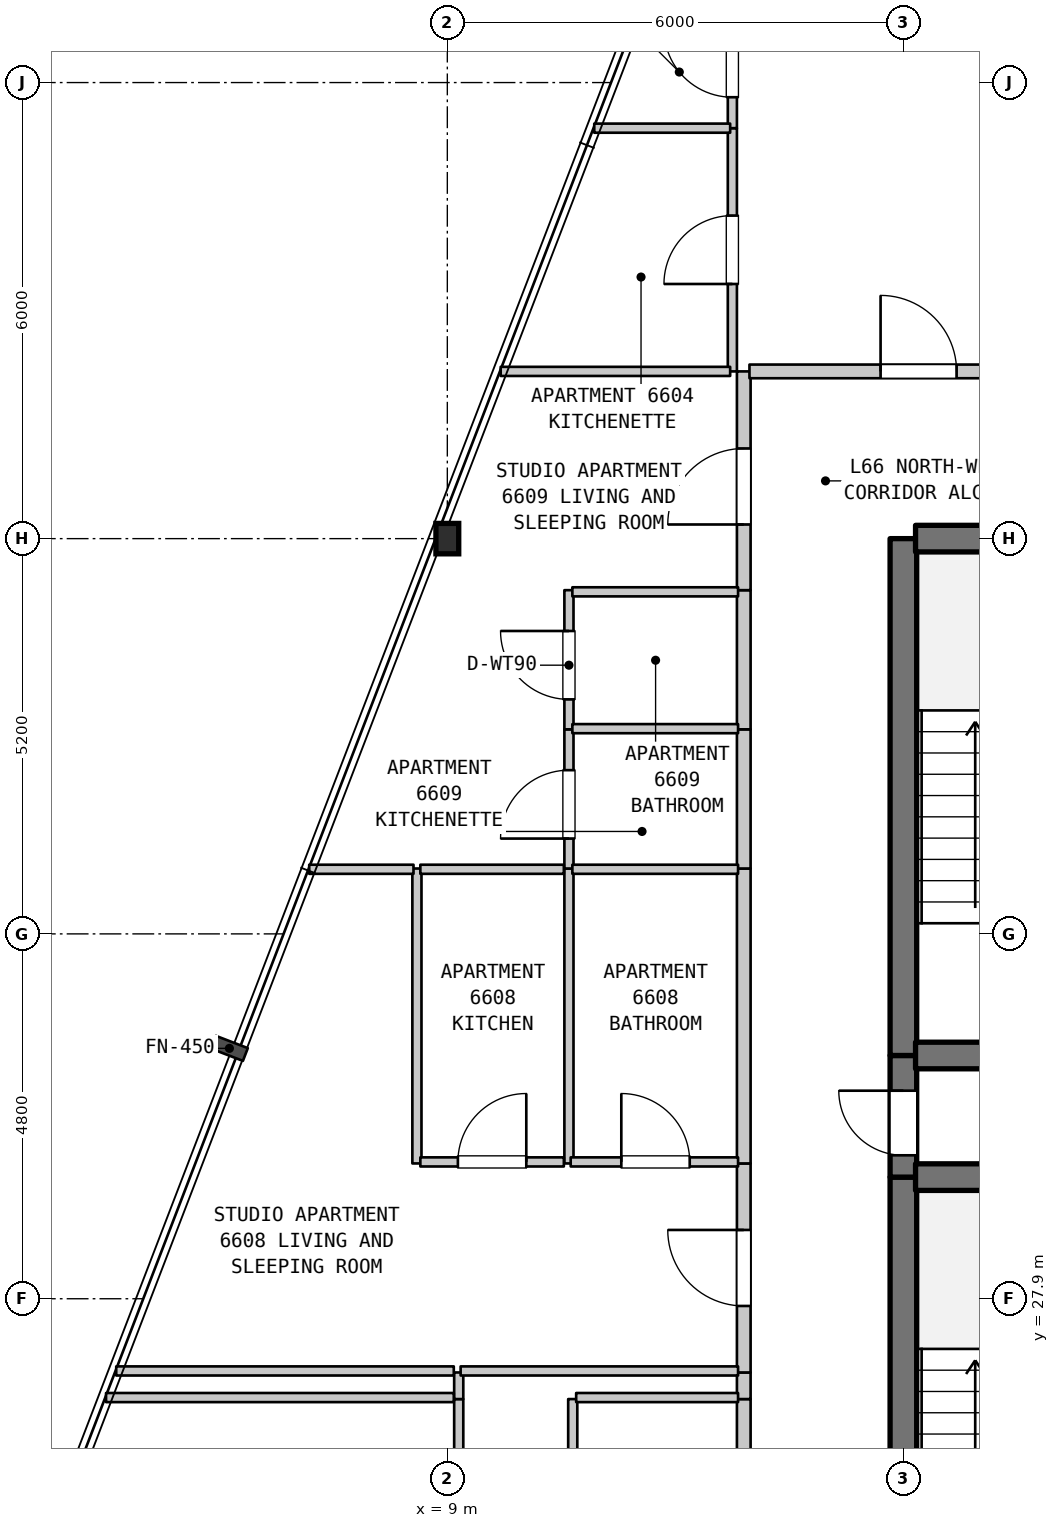
"""IFC4 building model, lengths in metres.
Left out: names, types, materials, properties, quantities, classifications, styles, units other than length and angle.
Written with IfcOpenShell. Run it as: python <this file> out.ifc"""

import sys

from ifc_helpers import new_model, si_unit, direction, frame, frame_2d, origin, origin_2d, place, context, subcontext, project, spatial, rectangle, i_section, extrude, element, fill, save


model = new_model("IFC4")
c1 = context("Model", 3, precision=1e-05, world=origin(), true_north=direction((0.0, 1.0)))
c2 = subcontext(c1, "Body", "Model", "MODEL_VIEW")
j1 = project(units=[si_unit("LENGTHUNIT", "METRE"), si_unit("PLANEANGLEUNIT", "RADIAN")], contexts=[c1])
p1 = place(None, origin())
s1 = spatial("IfcSite", under=j1, at=p1, CompositionType="ELEMENT")
p2 = place(p1, origin())
s2 = spatial("IfcBuilding", under=s1, at=p2, CompositionType="ELEMENT")
p3 = place(p2, frame((0.0, 0.0, 265.8)))
s3 = spatial("IfcBuildingStorey", under=s2, at=p3, CompositionType="ELEMENT", Elevation=265.8)
p4 = place(p3, frame((9.0, 37.9, 0.0), z_axis=(0.0, 0.0, 1.0), x_axis=(1.0, 0.0, 0.0)))
e1 = element("IfcColumn", 1, at=p4, inside=s3, PredefinedType="COLUMN", context=c2, shape_type="SweptSolid", body=[
    extrude(i_section(OverallWidth=0.3, OverallDepth=0.4, WebThickness=0.013, FlangeThickness=0.024, FilletRadius=0.027, at=origin_2d()), origin(), (0.0, 0.0, 1.0), 3.7),
])
p5 = place(p3, frame((8.6, 29.68, 0.0), z_axis=(0.0, 0.0, 1.0), x_axis=(0.0, 1.0, 0.0)))
e2 = element("IfcWall", 2, at=p5, inside=s3, PredefinedType="PARTITIONING", context=c2, shape_type="SweptSolid", body=[
    extrude(rectangle(XDim=3.88, YDim=0.12, at=frame_2d((1.94, 0.0))), origin(), (0.0, 0.0, 1.0), 3.39),
])
p6 = place(p3, frame((9.15, 20.5, 0.0), z_axis=(0.0, 0.0, 1.0), x_axis=(0.0, 1.0, 0.0)))
e3 = element("IfcWall", 3, at=p6, inside=s3, PredefinedType="PARTITIONING", context=c2, shape_type="SweptSolid", body=[
    extrude(rectangle(XDim=6.08, YDim=0.12, at=frame_2d((3.04, 0.0))), origin(), (0.0, 0.0, 1.0), 2.79),
])
p7 = place(p6, frame((1.173, 0.0, 0.0)))
e4 = element("IfcOpeningElement", 4, at=p7, cuts=e3, PredefinedType="OPENING", context=c2, shape_type="SweptSolid", body=[
    extrude(rectangle(XDim=0.9, YDim=2.15, at=frame_2d((0.45, 1.075))), frame((0.0, 0.07, 0.0), z_axis=(0.0, -1.0, 0.0), x_axis=(1.0, 0.0, 0.0)), (0.0, 0.0, 1.0), 0.14),
])
p8 = place(p6, frame((3.863, 0.0, 0.0)))
e5 = element("IfcOpeningElement", 5, at=p8, cuts=e3, PredefinedType="OPENING", context=c2, shape_type="SweptSolid", body=[
    extrude(rectangle(XDim=0.9, YDim=2.15, at=frame_2d((0.45, 1.075))), frame((0.0, 0.07, 0.0), z_axis=(0.0, -1.0, 0.0), x_axis=(1.0, 0.0, 0.0)), (0.0, 0.0, 1.0), 0.14),
])
p9 = place(p3, frame((9.15, 26.58, 0.0), z_axis=(0.0, 0.0, 1.0), x_axis=(0.0, 1.0, 0.0)))
e6 = element("IfcWall", 6, at=p9, inside=s3, PredefinedType="PARTITIONING", context=c2, shape_type="SweptSolid", body=[
    extrude(rectangle(XDim=0.35, YDim=0.12, at=frame_2d((0.175, 0.0))), origin(), (0.0, 0.0, 1.0), 3.39),
])
p10 = place(p3, frame((10.6, 29.68, 0.0), z_axis=(0.0, 0.0, 1.0), x_axis=(0.0, 1.0, 0.0)))
e7 = element("IfcWall", 7, at=p10, inside=s3, PredefinedType="PARTITIONING", context=c2, shape_type="SweptSolid", body=[
    extrude(rectangle(XDim=3.88, YDim=0.12, at=frame_2d((1.94, 0.0))), origin(), (0.0, 0.0, 1.0), 3.39),
])
p11 = place(p3, frame((10.6, 33.56, 0.0), z_axis=(0.0, 0.0, 1.0), x_axis=(0.0, 1.0, 0.0)))
e8 = element("IfcWall", 8, at=p11, inside=s3, PredefinedType="PARTITIONING", context=c2, shape_type="SweptSolid", body=[
    extrude(rectangle(XDim=1.831, YDim=0.12, at=frame_2d((0.916, 0.0))), origin(), (0.0, 0.0, 1.0), 3.39),
])
p12 = place(p11, frame((0.394, 0.0, 0.0)))
e9 = element("IfcOpeningElement", 9, at=p12, cuts=e8, PredefinedType="OPENING", context=c2, shape_type="SweptSolid", body=[
    extrude(rectangle(XDim=0.9, YDim=2.15, at=frame_2d((0.45, 1.075))), frame((0.0, 0.07, 0.0), z_axis=(0.0, -1.0, 0.0), x_axis=(1.0, 0.0, 0.0)), (0.0, 0.0, 1.0), 0.14),
])
p13 = place(p3, frame((10.6, 35.391, 0.0), z_axis=(0.0, 0.0, 1.0), x_axis=(0.0, 1.0, 0.0)))
e10 = element("IfcWall", 10, at=p13, inside=s3, PredefinedType="PARTITIONING", context=c2, shape_type="SweptSolid", body=[
    extrude(rectangle(XDim=1.831, YDim=0.12, at=frame_2d((0.916, 0.0))), origin(), (0.0, 0.0, 1.0), 3.39),
])
p14 = place(p13, frame((0.394, 0.0, 0.0)))
e11 = element("IfcOpeningElement", 11, at=p14, cuts=e10, PredefinedType="OPENING", context=c2, shape_type="SweptSolid", body=[
    extrude(rectangle(XDim=0.9, YDim=2.1, at=frame_2d((0.45, 1.05))), frame((0.0, 0.07, 0.0), z_axis=(0.0, -1.0, 0.0), x_axis=(1.0, 0.0, 0.0)), (0.0, 0.0, 1.0), 0.14),
])
p15 = place(p3, frame((10.65, 23.662, 0.0), z_axis=(0.0, 0.0, 1.0), x_axis=(0.0, 1.0, 0.0)))
e12 = element("IfcWall", 12, at=p15, inside=s3, PredefinedType="PARTITIONING", context=c2, shape_type="SweptSolid", body=[
    extrude(rectangle(XDim=2.918, YDim=0.12, at=frame_2d((1.459, 0.0))), origin(), (0.0, 0.0, 1.0), 3.39),
])
p16 = place(p15, frame((1.009, 0.0, 0.0)))
e13 = element("IfcOpeningElement", 13, at=p16, cuts=e12, PredefinedType="OPENING", context=c2, shape_type="SweptSolid", body=[
    extrude(rectangle(XDim=0.9, YDim=2.1, at=frame_2d((0.45, 1.05))), frame((0.0, 0.07, 0.0), z_axis=(0.0, -1.0, 0.0), x_axis=(1.0, 0.0, 0.0)), (0.0, 0.0, 1.0), 0.14),
])
p17 = place(p3, frame((12.75, 40.1, 0.0), z_axis=(0.0, 0.0, 1.0), x_axis=(0.0, 1.0, 0.0)))
e14 = element("IfcWall", 14, at=p17, inside=s3, PredefinedType="PARTITIONING", context=c2, shape_type="SweptSolid", body=[
    extrude(rectangle(XDim=3.2, YDim=0.12, at=frame_2d((1.6, 0.0))), origin(), (0.0, 0.0, 1.0), 3.39),
])
p18 = place(p17, frame((1.15, 0.0, 0.0)))
e15 = element("IfcOpeningElement", 15, at=p18, cuts=e14, PredefinedType="OPENING", context=c2, shape_type="SweptSolid", body=[
    extrude(rectangle(XDim=0.9, YDim=2.15, at=frame_2d((0.45, 1.075))), frame((0.0, 0.07, 0.0), z_axis=(0.0, -1.0, 0.0), x_axis=(1.0, 0.0, 0.0)), (0.0, 0.0, 1.0), 0.14),
])
p19 = place(p3, frame((12.75, 43.3, 0.0), z_axis=(0.0, 0.0, 1.0), x_axis=(0.0, 1.0, 0.0)))
e16 = element("IfcWall", 16, at=p19, inside=s3, PredefinedType="PARTITIONING", context=c2, shape_type="SweptSolid", body=[
    extrude(rectangle(XDim=2.9, YDim=0.12, at=frame_2d((1.45, 0.0))), origin(), (0.0, 0.0, 1.0), 3.39),
])
p20 = place(p19, frame((0.407, 0.0, 0.0)))
e17 = element("IfcOpeningElement", 17, at=p20, cuts=e16, PredefinedType="OPENING", context=c2, shape_type="SweptSolid", body=[
    extrude(rectangle(XDim=0.9, YDim=2.1, at=frame_2d((0.45, 1.05))), frame((0.0, 0.07, 0.0), z_axis=(0.0, -1.0, 0.0), x_axis=(1.0, 0.0, 0.0)), (0.0, 0.0, 1.0), 0.14),
])
p21 = place(p3, frame((12.9, 23.662, 0.0), z_axis=(0.0, 0.0, 1.0), x_axis=(0.0, 1.0, 0.0)))
e18 = element("IfcWall", 18, at=p21, inside=s3, PredefinedType="STANDARD", context=c2, shape_type="SweptSolid", body=[
    extrude(rectangle(XDim=2.918, YDim=0.18, at=frame_2d((1.459, 0.0))), origin(), (0.0, 0.0, 1.0), 3.39),
])
p22 = place(p3, frame((12.9, 26.58, 0.0), z_axis=(0.0, 0.0, 1.0), x_axis=(0.0, 1.0, 0.0)))
e19 = element("IfcWall", 19, at=p22, inside=s3, PredefinedType="STANDARD", context=c2, shape_type="SweptSolid", body=[
    extrude(rectangle(XDim=0.35, YDim=0.18, at=frame_2d((0.175, 0.0))), origin(), (0.0, 0.0, 1.0), 3.39),
])
p23 = place(p3, frame((12.9, 26.93, 0.0), z_axis=(0.0, 0.0, 1.0), x_axis=(0.0, 1.0, 0.0)))
e20 = element("IfcWall", 20, at=p23, inside=s3, PredefinedType="STANDARD", context=c2, shape_type="SweptSolid", body=[
    extrude(rectangle(XDim=2.75, YDim=0.18, at=frame_2d((1.375, 0.0))), origin(), (0.0, 0.0, 1.0), 3.39),
])
p24 = place(p23, frame((0.875, 0.0, 0.0)))
e21 = element("IfcOpeningElement", 21, at=p24, cuts=e20, PredefinedType="OPENING", context=c2, shape_type="SweptSolid", body=[
    extrude(rectangle(XDim=1.0, YDim=2.15, at=frame_2d((0.5, 1.075))), frame((0.0, 0.1, 0.0), z_axis=(0.0, -1.0, 0.0), x_axis=(1.0, 0.0, 0.0)), (0.0, 0.0, 1.0), 0.2),
])
p25 = place(p3, frame((12.9, 29.68, 0.0), z_axis=(0.0, 0.0, 1.0), x_axis=(0.0, 1.0, 0.0)))
e22 = element("IfcWall", 22, at=p25, inside=s3, PredefinedType="STANDARD", context=c2, shape_type="SweptSolid", body=[
    extrude(rectangle(XDim=3.88, YDim=0.18, at=frame_2d((1.94, 0.0))), origin(), (0.0, 0.0, 1.0), 3.39),
])
p26 = place(p3, frame((12.9, 33.56, 0.0), z_axis=(0.0, 0.0, 1.0), x_axis=(0.0, 1.0, 0.0)))
e23 = element("IfcWall", 23, at=p26, inside=s3, PredefinedType="STANDARD", context=c2, shape_type="SweptSolid", body=[
    extrude(rectangle(XDim=1.831, YDim=0.18, at=frame_2d((0.916, 0.0))), origin(), (0.0, 0.0, 1.0), 3.39),
])
p27 = place(p3, frame((12.9, 35.391, 0.0), z_axis=(0.0, 0.0, 1.0), x_axis=(0.0, 1.0, 0.0)))
e24 = element("IfcWall", 24, at=p27, inside=s3, PredefinedType="STANDARD", context=c2, shape_type="SweptSolid", body=[
    extrude(rectangle(XDim=1.831, YDim=0.18, at=frame_2d((0.916, 0.0))), origin(), (0.0, 0.0, 1.0), 3.39),
])
p28 = place(p3, frame((12.9, 37.222, 0.0), z_axis=(0.0, 0.0, 1.0), x_axis=(0.0, 1.0, 0.0)))
e25 = element("IfcWall", 25, at=p28, inside=s3, PredefinedType="STANDARD", context=c2, shape_type="SweptSolid", body=[
    extrude(rectangle(XDim=2.878, YDim=0.18, at=frame_2d((1.439, 0.0))), origin(), (0.0, 0.0, 1.0), 3.39),
])
p29 = place(p28, frame((0.864, 0.0, 0.0)))
e26 = element("IfcOpeningElement", 26, at=p29, cuts=e25, PredefinedType="OPENING", context=c2, shape_type="SweptSolid", body=[
    extrude(rectangle(XDim=1.0, YDim=2.15, at=frame_2d((0.5, 1.075))), frame((0.0, 0.1, 0.0), z_axis=(0.0, -1.0, 0.0), x_axis=(1.0, 0.0, 0.0)), (0.0, 0.0, 1.0), 0.2),
])
p30 = place(p3, frame((15.0, 22.7, 0.0), z_axis=(0.0, 0.0, 1.0), x_axis=(0.0, 1.0, 0.0)))
e27 = element("IfcWall", 27, at=p30, inside=s3, PredefinedType="SHEAR", context=c2, shape_type="SweptSolid", body=[
    extrude(rectangle(XDim=6.8, YDim=0.35, at=frame_2d((3.4, 0.0))), origin(), (0.0, 0.0, 1.0), 3.39),
])
p31 = place(p3, frame((15.0, 29.5, 0.0), z_axis=(0.0, 0.0, 1.0), x_axis=(0.0, 1.0, 0.0)))
e28 = element("IfcWall", 28, at=p31, inside=s3, PredefinedType="SHEAR", context=c2, shape_type="SweptSolid", body=[
    extrude(rectangle(XDim=1.6, YDim=0.35, at=frame_2d((0.8, 0.0))), origin(), (0.0, 0.0, 1.0), 3.39),
])
p32 = place(p31, frame((0.287, 0.0, 0.0)))
e29 = element("IfcOpeningElement", 29, at=p32, cuts=e28, PredefinedType="OPENING", context=c2, shape_type="SweptSolid", body=[
    extrude(rectangle(XDim=0.85, YDim=2.1, at=frame_2d((0.425, 1.05))), frame((0.0, 0.185, 0.0), z_axis=(0.0, -1.0, 0.0), x_axis=(1.0, 0.0, 0.0)), (0.0, 0.0, 1.0), 0.37),
])
p33 = place(p3, frame((15.0, 31.1, 0.0), z_axis=(0.0, 0.0, 1.0), x_axis=(0.0, 1.0, 0.0)))
e30 = element("IfcWall", 30, at=p33, inside=s3, PredefinedType="SHEAR", context=c2, shape_type="SweptSolid", body=[
    extrude(rectangle(XDim=6.8, YDim=0.35, at=frame_2d((3.4, 0.0))), origin(), (0.0, 0.0, 1.0), 3.39),
])
p34 = place(p3, frame((4.51, 26.6, 0.0), z_axis=(0.0, 0.0, 1.0), x_axis=(1.0, 0.0, 0.0)))
e31 = element("IfcWall", 31, at=p34, inside=s3, PredefinedType="PARTITIONING", context=c2, shape_type="SweptSolid", body=[
    extrude(rectangle(XDim=4.575, YDim=0.12, at=frame_2d((2.288, 0.0))), origin(), (0.0, 0.0, 1.0), 3.39),
])
p35 = place(p3, frame((10.695, 26.6, 0.0), z_axis=(0.0, 0.0, 1.0), x_axis=(1.0, 0.0, 0.0)))
e32 = element("IfcWall", 32, at=p35, inside=s3, PredefinedType="PARTITIONING", context=c2, shape_type="SweptSolid", body=[
    extrude(rectangle(XDim=2.13, YDim=0.12, at=frame_2d((1.065, 0.0))), origin(), (0.0, 0.0, 1.0), 3.39),
])
p36 = place(p3, frame((4.644, 26.95, 0.0), z_axis=(0.0, 0.0, 1.0), x_axis=(1.0, 0.0, 0.0)))
e33 = element("IfcWall", 33, at=p36, inside=s3, PredefinedType="PARTITIONING", context=c2, shape_type="SweptSolid", body=[
    extrude(rectangle(XDim=4.441, YDim=0.12, at=frame_2d((2.22, 0.0))), origin(), (0.0, 0.0, 1.0), 3.39),
])
p37 = place(p3, frame((9.175, 26.95, 0.0), z_axis=(0.0, 0.0, 1.0), x_axis=(1.0, 0.0, 0.0)))
e34 = element("IfcWall", 34, at=p37, inside=s3, PredefinedType="PARTITIONING", context=c2, shape_type="SweptSolid", body=[
    extrude(rectangle(XDim=3.65, YDim=0.12, at=frame_2d((1.825, 0.0))), origin(), (0.0, 0.0, 1.0), 3.39),
])
p38 = place(p3, frame((15.16, 29.5, 0.0), z_axis=(0.0, 0.0, 1.0), x_axis=(1.0, 0.0, 0.0)))
e35 = element("IfcWall", 35, at=p38, inside=s3, PredefinedType="SHEAR", context=c2, shape_type="SweptSolid", body=[
    extrude(rectangle(XDim=3.68, YDim=0.35, at=frame_2d((1.84, 0.0))), origin(), (0.0, 0.0, 1.0), 3.39),
])
p39 = place(p3, frame((8.645, 29.7, 0.0), z_axis=(0.0, 0.0, 1.0), x_axis=(1.0, 0.0, 0.0)))
e36 = element("IfcWall", 36, at=p39, inside=s3, PredefinedType="PARTITIONING", context=c2, shape_type="SweptSolid", body=[
    extrude(rectangle(XDim=1.888, YDim=0.12, at=frame_2d((0.944, 0.0))), origin(), (0.0, 0.0, 1.0), 3.39),
])
p40 = place(p39, frame((0.494, 0.0, 0.0)))
e37 = element("IfcOpeningElement", 37, at=p40, cuts=e36, PredefinedType="OPENING", context=c2, shape_type="SweptSolid", body=[
    extrude(rectangle(XDim=0.9, YDim=2.15, at=frame_2d((0.45, 1.075))), frame((0.0, 0.07, 0.0), z_axis=(0.0, -1.0, 0.0), x_axis=(1.0, 0.0, 0.0)), (0.0, 0.0, 1.0), 0.14),
])
p41 = place(p3, frame((10.623, 29.7, 0.0), z_axis=(0.0, 0.0, 1.0), x_axis=(1.0, 0.0, 0.0)))
e38 = element("IfcWall", 38, at=p41, inside=s3, PredefinedType="PARTITIONING", context=c2, shape_type="SweptSolid", body=[
    extrude(rectangle(XDim=2.202, YDim=0.12, at=frame_2d((1.101, 0.0))), origin(), (0.0, 0.0, 1.0), 3.39),
])
p42 = place(p41, frame((0.666, 0.0, 0.0)))
e39 = element("IfcOpeningElement", 39, at=p42, cuts=e38, PredefinedType="OPENING", context=c2, shape_type="SweptSolid", body=[
    extrude(rectangle(XDim=0.9, YDim=2.1, at=frame_2d((0.45, 1.05))), frame((0.0, 0.07, 0.0), z_axis=(0.0, -1.0, 0.0), x_axis=(1.0, 0.0, 0.0)), (0.0, 0.0, 1.0), 0.14),
])
p43 = place(p3, frame((15.16, 31.1, 0.0), z_axis=(0.0, 0.0, 1.0), x_axis=(1.0, 0.0, 0.0)))
e40 = element("IfcWall", 40, at=p43, inside=s3, PredefinedType="SHEAR", context=c2, shape_type="SweptSolid", body=[
    extrude(rectangle(XDim=3.68, YDim=0.35, at=frame_2d((1.84, 0.0))), origin(), (0.0, 0.0, 1.0), 3.39),
])
p44 = place(p3, frame((7.183, 33.55, 0.0), z_axis=(0.0, 0.0, 1.0), x_axis=(1.0, 0.0, 0.0)))
e41 = element("IfcWall", 41, at=p44, inside=s3, PredefinedType="PARTITIONING", context=c2, shape_type="SweptSolid", body=[
    extrude(rectangle(XDim=1.372, YDim=0.12, at=frame_2d((0.686, 0.0))), origin(), (0.0, 0.0, 1.0), 3.39),
])
p45 = place(p3, frame((8.645, 33.55, 0.0), z_axis=(0.0, 0.0, 1.0), x_axis=(1.0, 0.0, 0.0)))
e42 = element("IfcWall", 42, at=p45, inside=s3, PredefinedType="PARTITIONING", context=c2, shape_type="SweptSolid", body=[
    extrude(rectangle(XDim=1.888, YDim=0.12, at=frame_2d((0.944, 0.0))), origin(), (0.0, 0.0, 1.0), 3.39),
])
for number, where, z_axis, x_axis in (
    (43, (10.645, 33.55, 0.0), (0.0, 0.0, 1.0), (1.0, 0.0, 0.0)),
    (44, (10.645, 35.4, 0.0), (0.0, 0.0, 1.0), (1.0, 0.0, 0.0)),
    (45, (10.645, 37.2, 0.0), (0.0, 0.0, 1.0), (1.0, 0.0, 0.0)),
):
    element("IfcWall", number, at=place(p3, frame(where, z_axis=z_axis, x_axis=x_axis)), inside=s3, PredefinedType="PARTITIONING", context=c2, shape_type="SweptSolid", body=[
        extrude(rectangle(XDim=2.18, YDim=0.12, at=frame_2d((1.09, 0.0))), origin(), (0.0, 0.0, 1.0), 3.39),
    ])
p46 = place(p3, frame((15.16, 37.9, 0.0), z_axis=(0.0, 0.0, 1.0), x_axis=(1.0, 0.0, 0.0)))
e46 = element("IfcWall", 46, at=p46, inside=s3, PredefinedType="SHEAR", context=c2, shape_type="SweptSolid", body=[
    extrude(rectangle(XDim=3.68, YDim=0.35, at=frame_2d((1.84, 0.0))), origin(), (0.0, 0.0, 1.0), 3.39),
])
p47 = place(p3, frame((9.702, 40.1, 0.0), z_axis=(0.0, 0.0, 1.0), x_axis=(1.0, 0.0, 0.0)))
e47 = element("IfcWall", 47, at=p47, inside=s3, PredefinedType="PARTITIONING", context=c2, shape_type="SweptSolid", body=[
    extrude(rectangle(XDim=3.019, YDim=0.12, at=frame_2d((1.51, 0.0))), origin(), (0.0, 0.0, 1.0), 3.39),
])
p48 = place(p3, frame((12.975, 40.1, 0.0), z_axis=(0.0, 0.0, 1.0), x_axis=(1.0, 0.0, 0.0)))
e48 = element("IfcWall", 48, at=p48, inside=s3, PredefinedType="STANDARD", context=c2, shape_type="SweptSolid", body=[
    extrude(rectangle(XDim=4.48, YDim=0.18, at=frame_2d((2.24, 0.0))), origin(), (0.0, 0.0, 1.0), 3.39),
])
p49 = place(p48, frame((1.725, 0.0, 0.0)))
e49 = element("IfcOpeningElement", 49, at=p49, cuts=e48, PredefinedType="OPENING", context=c2, shape_type="SweptSolid", body=[
    extrude(rectangle(XDim=1.0, YDim=2.15, at=frame_2d((0.5, 1.075))), frame((0.0, 0.1, 0.0), z_axis=(0.0, -1.0, 0.0), x_axis=(1.0, 0.0, 0.0)), (0.0, 0.0, 1.0), 0.2),
])
p50 = place(p3, frame((10.933, 43.3, 0.0), z_axis=(0.0, 0.0, 1.0), x_axis=(1.0, 0.0, 0.0)))
e50 = element("IfcWall", 50, at=p50, inside=s3, PredefinedType="PARTITIONING", context=c2, shape_type="SweptSolid", body=[
    extrude(rectangle(XDim=1.788, YDim=0.12, at=frame_2d((0.894, 0.0))), origin(), (0.0, 0.0, 1.0), 3.39),
])
p51 = place(p12, origin())
e51 = element("IfcDoor", 51, at=p51, inside=s3, OperationType="SINGLE_SWING_LEFT", PredefinedType="DOOR", context=c2, shape_type="SweptSolid", body=[
    extrude(rectangle(XDim=0.9, YDim=2.15, at=frame_2d((0.45, 1.075))), frame((0.0, 0.025, 0.0), z_axis=(0.0, -1.0, 0.0), x_axis=(1.0, 0.0, 0.0)), (0.0, 0.0, 1.0), 0.05),
])
fill(e9, e51)
p52 = place(p14, origin())
e52 = element("IfcDoor", 52, at=p52, inside=s3, OperationType="SINGLE_SWING_RIGHT", PredefinedType="DOOR", context=c2, shape_type="SweptSolid", body=[
    extrude(rectangle(XDim=0.9, YDim=2.1, at=frame_2d((0.45, 1.05))), frame((0.0, 0.025, 0.0), z_axis=(0.0, -1.0, 0.0), x_axis=(1.0, 0.0, 0.0)), (0.0, 0.0, 1.0), 0.05),
])
fill(e11, e52)
p53 = place(p18, origin())
e53 = element("IfcDoor", 53, at=p53, inside=s3, OperationType="SINGLE_SWING_LEFT", PredefinedType="DOOR", context=c2, shape_type="SweptSolid", body=[
    extrude(rectangle(XDim=0.9, YDim=2.15, at=frame_2d((0.45, 1.075))), frame((0.0, 0.025, 0.0), z_axis=(0.0, -1.0, 0.0), x_axis=(1.0, 0.0, 0.0)), (0.0, 0.0, 1.0), 0.05),
])
fill(e15, e53)
p54 = place(p20, origin())
e54 = element("IfcDoor", 54, at=p54, inside=s3, OperationType="SINGLE_SWING_RIGHT", PredefinedType="DOOR", context=c2, shape_type="SweptSolid", body=[
    extrude(rectangle(XDim=0.9, YDim=2.1, at=frame_2d((0.45, 1.05))), frame((0.0, 0.025, 0.0), z_axis=(0.0, -1.0, 0.0), x_axis=(1.0, 0.0, 0.0)), (0.0, 0.0, 1.0), 0.05),
])
fill(e17, e54)
p55 = place(p24, origin())
e55 = element("IfcDoor", 55, at=p55, inside=s3, OperationType="SINGLE_SWING_RIGHT", PredefinedType="DOOR", context=c2, shape_type="SweptSolid", body=[
    extrude(rectangle(XDim=1.0, YDim=2.15, at=frame_2d((0.5, 1.075))), frame((0.0, 0.025, 0.0), z_axis=(0.0, -1.0, 0.0), x_axis=(1.0, 0.0, 0.0)), (0.0, 0.0, 1.0), 0.05),
])
fill(e21, e55)
p56 = place(p29, origin())
e56 = element("IfcDoor", 56, at=p56, inside=s3, OperationType="SINGLE_SWING_LEFT", PredefinedType="DOOR", context=c2, shape_type="SweptSolid", body=[
    extrude(rectangle(XDim=1.0, YDim=2.15, at=frame_2d((0.5, 1.075))), frame((0.0, 0.025, 0.0), z_axis=(0.0, -1.0, 0.0), x_axis=(1.0, 0.0, 0.0)), (0.0, 0.0, 1.0), 0.05),
])
fill(e26, e56)
p57 = place(p32, origin())
e57 = element("IfcDoor", 57, at=p57, inside=s3, OperationType="SINGLE_SWING_RIGHT", PredefinedType="DOOR", context=c2, shape_type="SweptSolid", body=[
    extrude(rectangle(XDim=0.85, YDim=2.1, at=frame_2d((0.425, 1.05))), frame((0.0, 0.025, 0.0), z_axis=(0.0, -1.0, 0.0), x_axis=(1.0, 0.0, 0.0)), (0.0, 0.0, 1.0), 0.05),
])
fill(e29, e57)
p58 = place(p40, origin())
e58 = element("IfcDoor", 58, at=p58, inside=s3, OperationType="SINGLE_SWING_RIGHT", PredefinedType="DOOR", context=c2, shape_type="SweptSolid", body=[
    extrude(rectangle(XDim=0.9, YDim=2.15, at=frame_2d((0.45, 1.075))), frame((0.0, 0.025, 0.0), z_axis=(0.0, -1.0, 0.0), x_axis=(1.0, 0.0, 0.0)), (0.0, 0.0, 1.0), 0.05),
])
fill(e37, e58)
p59 = place(p42, origin())
e59 = element("IfcDoor", 59, at=p59, inside=s3, OperationType="SINGLE_SWING_LEFT", PredefinedType="DOOR", context=c2, shape_type="SweptSolid", body=[
    extrude(rectangle(XDim=0.9, YDim=2.1, at=frame_2d((0.45, 1.05))), frame((0.0, 0.025, 0.0), z_axis=(0.0, -1.0, 0.0), x_axis=(1.0, 0.0, 0.0)), (0.0, 0.0, 1.0), 0.05),
])
fill(e39, e59)
p60 = place(p49, origin())
e60 = element("IfcDoor", 60, at=p60, inside=s3, OperationType="SINGLE_SWING_LEFT", PredefinedType="DOOR", context=c2, shape_type="SweptSolid", body=[
    extrude(rectangle(XDim=1.0, YDim=2.15, at=frame_2d((0.5, 1.075))), frame((0.0, 0.025, 0.0), z_axis=(0.0, -1.0, 0.0), x_axis=(1.0, 0.0, 0.0)), (0.0, 0.0, 1.0), 0.05),
])
fill(e49, e60)
save(model, sys.argv[1])
